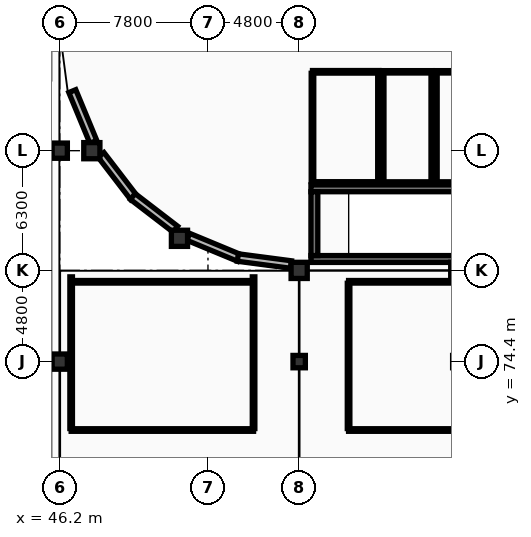
"""IFC4 building model, lengths in metres.
Left out: names, types, materials, properties, quantities, classifications, styles, units other than length and angle.
Written with IfcOpenShell. Run it as: python <this file> out.ifc"""

import sys

from ifc_helpers import new_model, si_unit, direction, frame, frame_2d, origin, origin_2d, place, context, subcontext, project, spatial, rectangle, circle, extrude, element, fill, save


model = new_model("IFC4")
c1 = context("Model", 3, precision=1e-05, world=origin(), true_north=direction((0.0, 1.0)))
c2 = subcontext(c1, "Body", "Model", "MODEL_VIEW")
j1 = project(units=[si_unit("LENGTHUNIT", "METRE"), si_unit("PLANEANGLEUNIT", "RADIAN")], contexts=[c1])
p1 = place(None, origin())
s1 = spatial("IfcSite", under=j1, at=p1, CompositionType="ELEMENT")
p2 = place(p1, origin())
s2 = spatial("IfcBuilding", under=s1, at=p2, CompositionType="ELEMENT")
p3 = place(p2, origin())
s3 = spatial("IfcBuildingStorey", under=s2, at=p3, CompositionType="ELEMENT", Elevation=0.0)
for number, where, z_axis, x_axis in (
    (1, (58.8, 79.2, 0.0), (0.0, 0.0, 1.0), (1.0, 0.0, 0.0)),
    (2, (67.2, 79.2, 0.0), (0.0, 0.0, 1.0), (1.0, 0.0, 0.0)),
):
    element("IfcColumn", number, at=place(p3, frame(where, z_axis=z_axis, x_axis=x_axis)), inside=s3, PredefinedType="COLUMN", context=c2, shape_type="SweptSolid", body=[
        extrude(rectangle(XDim=0.85, YDim=0.85, at=origin_2d()), origin(), (0.0, 0.0, 1.0), 5.4),
    ])
for number, where, z_axis, x_axis in (
    (3, (47.888, 85.5, 0.0), (0.0, 0.0, 1.0), (1.0, 0.0, 0.0)),
    (4, (52.5, 80.888, 0.0), (0.0, 0.0, 1.0), (1.0, 0.0, 0.0)),
):
    element("IfcColumn", number, at=place(p3, frame(where, z_axis=z_axis, x_axis=x_axis)), inside=s3, PredefinedType="COLUMN", context=c2, shape_type="SweptSolid", body=[
        extrude(circle(Radius=0.425, at=origin_2d()), origin(), (0.0, 0.0, 1.0), 5.4),
    ])
for number, where, z_axis, x_axis in (
    (5, (46.2, 74.4, 0.0), (0.0, 0.0, 1.0), (1.0, 0.0, 0.0)),
    (6, (46.2, 85.5, 0.0), (0.0, 0.0, 1.0), (1.0, 0.0, 0.0)),
):
    element("IfcColumn", number, at=place(p3, frame(where, z_axis=z_axis, x_axis=x_axis)), inside=s3, PredefinedType="COLUMN", context=c2, shape_type="SweptSolid", body=[
        extrude(rectangle(XDim=0.8, YDim=0.8, at=origin_2d()), origin(), (0.0, 0.0, 1.0), 5.4),
    ])
p4 = place(p3, frame((58.8, 74.4, 0.0), z_axis=(0.0, 0.0, 1.0), x_axis=(1.0, 0.0, 0.0)))
e7 = element("IfcColumn", 7, at=p4, inside=s3, PredefinedType="COLUMN", context=c2, shape_type="SweptSolid", body=[
    extrude(rectangle(XDim=0.65, YDim=0.65, at=origin_2d()), origin(), (0.0, 0.0, 1.0), 5.4),
])
p5 = place(p3, frame((46.86, 88.635, 0.0), z_axis=(0.0, 0.0, 1.0), x_axis=(0.382642547526, -0.923896466506, 0.0)))
e8 = element("IfcWall", 8, at=p5, inside=s3, PredefinedType="ELEMENTEDWALL", context=c2, shape_type="SweptSolid", body=[
    extrude(rectangle(XDim=2.892, YDim=0.395, at=frame_2d((1.446, 0.0))), origin(), (0.0, 0.0, 1.0), 4.27),
])
p6 = place(p5, frame((0.962, 0.0, 0.85)))
e9 = element("IfcOpeningElement", 9, at=p6, cuts=e8, PredefinedType="OPENING", context=c2, shape_type="SweptSolid", body=[
    extrude(rectangle(XDim=0.9, YDim=1.85, at=frame_2d((0.45, 0.925))), frame((0.0, 0.208, 0.0), z_axis=(0.0, -1.0, 0.0), x_axis=(1.0, 0.0, 0.0)), (0.0, 0.0, 1.0), 0.415),
])
p7 = place(p3, frame((48.369, 85.283, 0.0), z_axis=(0.0, 0.0, 1.0), x_axis=(0.608787157184, -0.793333597705, 0.0)))
e10 = element("IfcWall", 10, at=p7, inside=s3, PredefinedType="ELEMENTEDWALL", context=c2, shape_type="SweptSolid", body=[
    extrude(rectangle(XDim=2.824, YDim=0.395, at=frame_2d((1.412, 0.0))), origin(), (0.0, 0.0, 1.0), 4.27),
])
p8 = place(p7, frame((0.962, 0.0, 0.85)))
e11 = element("IfcOpeningElement", 11, at=p8, cuts=e10, PredefinedType="OPENING", context=c2, shape_type="SweptSolid", body=[
    extrude(rectangle(XDim=0.9, YDim=1.85, at=frame_2d((0.45, 0.925))), frame((0.0, 0.208, 0.0), z_axis=(0.0, -1.0, 0.0), x_axis=(1.0, 0.0, 0.0)), (0.0, 0.0, 1.0), 0.415),
])
p9 = place(p3, frame((50.043, 83.089, 0.0), z_axis=(0.0, 0.0, 1.0), x_axis=(0.793301558375, -0.608828906574, 0.0)))
e12 = element("IfcWall", 12, at=p9, inside=s3, PredefinedType="ELEMENTEDWALL", context=c2, shape_type="SweptSolid", body=[
    extrude(rectangle(XDim=2.824, YDim=0.395, at=frame_2d((1.412, 0.0))), origin(), (0.0, 0.0, 1.0), 4.17),
])
p10 = place(p9, frame((0.962, 0.0, 0.85)))
e13 = element("IfcOpeningElement", 13, at=p10, cuts=e12, PredefinedType="OPENING", context=c2, shape_type="SweptSolid", body=[
    extrude(rectangle(XDim=0.9, YDim=1.85, at=frame_2d((0.45, 0.925))), frame((0.0, 0.208, 0.0), z_axis=(0.0, -1.0, 0.0), x_axis=(1.0, 0.0, 0.0)), (0.0, 0.0, 1.0), 0.415),
])
p11 = place(p3, frame((52.962, 80.967, 0.0), z_axis=(0.0, 0.0, 1.0), x_axis=(0.923896466506, -0.382642547526, 0.0)))
e14 = element("IfcWall", 14, at=p11, inside=s3, PredefinedType="ELEMENTEDWALL", context=c2, shape_type="SweptSolid", body=[
    extrude(rectangle(XDim=2.892, YDim=0.395, at=frame_2d((1.446, 0.0))), origin(), (0.0, 0.0, 1.0), 4.17),
])
p12 = place(p11, frame((1.03, 0.0, 0.85)))
e15 = element("IfcOpeningElement", 15, at=p12, cuts=e14, PredefinedType="OPENING", context=c2, shape_type="SweptSolid", body=[
    extrude(rectangle(XDim=0.9, YDim=1.85, at=frame_2d((0.45, 0.925))), frame((0.0, 0.208, 0.0), z_axis=(0.0, -1.0, 0.0), x_axis=(1.0, 0.0, 0.0)), (0.0, 0.0, 1.0), 0.415),
])
p13 = place(p3, frame((55.572, 79.877, 0.0), z_axis=(0.0, 0.0, 1.0), x_axis=(0.991443994311, -0.130532778046, 0.0)))
e16 = element("IfcWall", 16, at=p13, inside=s3, PredefinedType="ELEMENTEDWALL", context=c2, shape_type="SweptSolid", body=[
    extrude(rectangle(XDim=2.824, YDim=0.395, at=frame_2d((1.412, 0.0))), origin(), (0.0, 0.0, 1.0), 4.27),
])
for number, where, z_axis, x_axis in (
    (17, (59.42, 83.52, 0.0), (0.0, 0.0, 1.0), (1.0, 0.0, 0.0)),
    (18, (68.78, 79.8, 0.0), (0.0, 0.0, 1.0), (-1.0, 0.0, 0.0)),
):
    element("IfcWall", number, at=place(p3, frame(where, z_axis=z_axis, x_axis=x_axis)), inside=s3, PredefinedType="SHEAR", context=c2, shape_type="SweptSolid", body=[
        extrude(rectangle(XDim=9.36, YDim=0.36, at=frame_2d((4.68, 0.0))), origin(), (0.0, 0.0, 1.0), 5.14),
    ])
p14 = place(p3, frame((59.6, 79.98, 0.0), z_axis=(0.0, 0.0, 1.0), x_axis=(0.0, 1.0, 0.0)))
e19 = element("IfcWall", 19, at=p14, inside=s3, PredefinedType="SHEAR", context=c2, shape_type="SweptSolid", body=[
    extrude(rectangle(XDim=3.36, YDim=0.36, at=frame_2d((1.68, 0.0))), origin(), (0.0, 0.0, 1.0), 5.14),
])
p15 = place(p14, frame((1.08, 0.0, 0.0)))
e20 = element("IfcOpeningElement", 20, at=p15, cuts=e19, PredefinedType="OPENING", context=c2, shape_type="SweptSolid", body=[
    extrude(rectangle(XDim=1.2, YDim=2.2, at=frame_2d((0.6, 1.1))), frame((0.0, 0.19, 0.0), z_axis=(0.0, -1.0, 0.0), x_axis=(1.0, 0.0, 0.0)), (0.0, 0.0, 1.0), 0.38),
])
p16 = place(p3, frame((63.2, 89.65, 0.0), z_axis=(0.0, 0.0, 1.0), x_axis=(1.0, 0.0, 0.0)))
e21 = element("IfcWall", 21, at=p16, inside=s3, PredefinedType="PARTITIONING", context=c2, shape_type="SweptSolid", body=[
    extrude(rectangle(XDim=2.6, YDim=0.125, at=frame_2d((1.3, 0.0))), origin(), (0.0, 0.0, 1.0), 5.125),
])
p17 = place(p16, frame((0.85, 0.0, 0.0)))
e22 = element("IfcOpeningElement", 22, at=p17, cuts=e21, PredefinedType="OPENING", context=c2, shape_type="SweptSolid", body=[
    extrude(rectangle(XDim=0.9, YDim=2.1, at=frame_2d((0.45, 1.05))), frame((0.0, 0.073, 0.0), z_axis=(0.0, -1.0, 0.0), x_axis=(1.0, 0.0, 0.0)), (0.0, 0.0, 1.0), 0.145),
])
p18 = place(p3, frame((65.8, 83.8, 0.0), z_axis=(0.0, 0.0, 1.0), x_axis=(-1.0, 0.0, 0.0)))
e23 = element("IfcWall", 23, at=p18, inside=s3, PredefinedType="PARTITIONING", context=c2, shape_type="SweptSolid", body=[
    extrude(rectangle(XDim=2.6, YDim=0.125, at=frame_2d((1.3, 0.0))), origin(), (0.0, 0.0, 1.0), 5.125),
])
for number, where, z_axis, x_axis in (
    (24, (63.2, 83.873, 0.0), (0.0, 0.0, 1.0), (0.0, 1.0, 0.0)),
    (25, (65.8, 89.577, 0.0), (0.0, 0.0, 1.0), (0.0, -1.0, 0.0)),
):
    element("IfcWall", number, at=place(p3, frame(where, z_axis=z_axis, x_axis=x_axis)), inside=s3, PredefinedType="PARTITIONING", context=c2, shape_type="SweptSolid", body=[
        extrude(rectangle(XDim=5.705, YDim=0.125, at=frame_2d((2.853, 0.0))), origin(), (0.0, 0.0, 1.0), 5.125),
    ])
p19 = place(p3, frame((66.0, 89.65, 0.0), z_axis=(0.0, 0.0, 1.0), x_axis=(1.0, 0.0, 0.0)))
e26 = element("IfcWall", 26, at=p19, inside=s3, PredefinedType="PARTITIONING", context=c2, shape_type="SweptSolid", body=[
    extrude(rectangle(XDim=2.6, YDim=0.125, at=frame_2d((1.3, 0.0))), origin(), (0.0, 0.0, 1.0), 4.27),
])
p20 = place(p19, frame((0.8, 0.0, 0.0)))
e27 = element("IfcOpeningElement", 27, at=p20, cuts=e26, PredefinedType="OPENING", context=c2, shape_type="SweptSolid", body=[
    extrude(rectangle(XDim=1.0, YDim=2.1, at=frame_2d((0.5, 1.05))), frame((0.0, 0.073, 0.0), z_axis=(0.0, -1.0, 0.0), x_axis=(1.0, 0.0, 0.0)), (0.0, 0.0, 1.0), 0.145),
])
p21 = place(p3, frame((68.6, 83.8, 0.0), z_axis=(0.0, 0.0, 1.0), x_axis=(-1.0, 0.0, 0.0)))
e28 = element("IfcWall", 28, at=p21, inside=s3, PredefinedType="PARTITIONING", context=c2, shape_type="SweptSolid", body=[
    extrude(rectangle(XDim=2.6, YDim=0.125, at=frame_2d((1.3, 0.0))), origin(), (0.0, 0.0, 1.0), 4.27),
])
p22 = place(p3, frame((66.0, 83.873, 0.0), z_axis=(0.0, 0.0, 1.0), x_axis=(0.0, 1.0, 0.0)))
e29 = element("IfcWall", 29, at=p22, inside=s3, PredefinedType="PARTITIONING", context=c2, shape_type="SweptSolid", body=[
    extrude(rectangle(XDim=5.705, YDim=0.125, at=frame_2d((2.853, 0.0))), origin(), (0.0, 0.0, 1.0), 5.125),
])
p23 = place(p3, frame((59.5, 89.65, 0.0), z_axis=(0.0, 0.0, 1.0), x_axis=(1.0, 0.0, 0.0)))
e30 = element("IfcWall", 30, at=p23, inside=s3, PredefinedType="PARTITIONING", context=c2, shape_type="SweptSolid", body=[
    extrude(rectangle(XDim=3.5, YDim=0.135, at=frame_2d((1.75, 0.0))), origin(), (0.0, 0.0, 1.0), 5.125),
])
p24 = place(p23, frame((1.275, 0.0, 0.0)))
e31 = element("IfcOpeningElement", 31, at=p24, cuts=e30, PredefinedType="OPENING", context=c2, shape_type="SweptSolid", body=[
    extrude(rectangle(XDim=0.95, YDim=2.15, at=frame_2d((0.475, 1.075))), frame((0.0, 0.077, 0.0), z_axis=(0.0, -1.0, 0.0), x_axis=(1.0, 0.0, 0.0)), (0.0, 0.0, 1.0), 0.155),
])
p25 = place(p3, frame((63.0, 83.8, 0.0), z_axis=(0.0, 0.0, 1.0), x_axis=(-1.0, 0.0, 0.0)))
e32 = element("IfcWall", 32, at=p25, inside=s3, PredefinedType="PARTITIONING", context=c2, shape_type="SweptSolid", body=[
    extrude(rectangle(XDim=3.5, YDim=0.135, at=frame_2d((1.75, 0.0))), origin(), (0.0, 0.0, 1.0), 5.125),
])
for number, where, z_axis, x_axis in (
    (33, (59.5, 83.877, 0.0), (0.0, 0.0, 1.0), (0.0, 1.0, 0.0)),
    (34, (63.0, 89.573, 0.0), (0.0, 0.0, 1.0), (0.0, -1.0, 0.0)),
):
    element("IfcWall", number, at=place(p3, frame(where, z_axis=z_axis, x_axis=x_axis)), inside=s3, PredefinedType="PARTITIONING", context=c2, shape_type="SweptSolid", body=[
        extrude(rectangle(XDim=5.695, YDim=0.135, at=frame_2d((2.848, 0.0))), origin(), (0.0, 0.0, 1.0), 5.125),
    ])
p26 = place(p3, frame((46.8, 78.6, 0.0), z_axis=(0.0, 0.0, 1.0), x_axis=(1.0, 0.0, 0.0)))
e35 = element("IfcWall", 35, at=p26, inside=s3, PredefinedType="PARTITIONING", context=c2, shape_type="SweptSolid", body=[
    extrude(rectangle(XDim=9.6, YDim=0.135, at=frame_2d((4.8, 0.0))), origin(), (0.0, 0.0, 1.0), 5.125),
])
p27 = place(p3, frame((56.4, 70.8, 0.0), z_axis=(0.0, 0.0, 1.0), x_axis=(-1.0, 0.0, 0.0)))
e36 = element("IfcWall", 36, at=p27, inside=s3, PredefinedType="PARTITIONING", context=c2, shape_type="SweptSolid", body=[
    extrude(rectangle(XDim=9.6, YDim=0.135, at=frame_2d((4.8, 0.0))), origin(), (0.0, 0.0, 1.0), 4.53),
])
p28 = place(p27, frame((1.94, 0.0, 0.0)))
e37 = element("IfcOpeningElement", 37, at=p28, cuts=e36, PredefinedType="OPENING", context=c2, shape_type="SweptSolid", body=[
    extrude(rectangle(XDim=0.95, YDim=2.15, at=frame_2d((0.475, 1.075))), frame((0.0, 0.077, 0.0), z_axis=(0.0, -1.0, 0.0), x_axis=(1.0, 0.0, 0.0)), (0.0, 0.0, 1.0), 0.155),
])
for number, where, z_axis, x_axis in (
    (38, (46.8, 70.877, 0.0), (0.0, 0.0, 1.0), (0.0, 1.0, 0.0)),
    (39, (56.4, 78.86, 0.0), (0.0, 0.0, 1.0), (0.0, -1.0, 0.0)),
):
    element("IfcWall", number, at=place(p3, frame(where, z_axis=z_axis, x_axis=x_axis)), inside=s3, PredefinedType="PARTITIONING", context=c2, shape_type="SweptSolid", body=[
        extrude(rectangle(XDim=7.983, YDim=0.135, at=frame_2d((3.991, 0.0))), origin(), (0.0, 0.0, 1.0), 4.23),
    ])
p29 = place(p3, frame((61.4, 78.6, 0.0), z_axis=(0.0, 0.0, 1.0), x_axis=(1.0, 0.0, 0.0)))
e40 = element("IfcWall", 40, at=p29, inside=s3, PredefinedType="PARTITIONING", context=c2, shape_type="SweptSolid", body=[
    extrude(rectangle(XDim=38.0, YDim=0.135, at=frame_2d((19.0, 0.0))), origin(), (0.0, 0.0, 1.0), 4.58),
])
p30 = place(p3, frame((99.4, 70.8, 0.0), z_axis=(0.0, 0.0, 1.0), x_axis=(-1.0, 0.0, 0.0)))
e41 = element("IfcWall", 41, at=p30, inside=s3, PredefinedType="PARTITIONING", context=c2, shape_type="SweptSolid", body=[
    extrude(rectangle(XDim=38.0, YDim=0.135, at=frame_2d((19.0, 0.0))), origin(), (0.0, 0.0, 1.0), 4.53),
])
p31 = place(p30, frame((2.167, 0.0, 0.0)))
e42 = element("IfcOpeningElement", 42, at=p31, cuts=e41, PredefinedType="OPENING", context=c2, shape_type="SweptSolid", body=[
    extrude(rectangle(XDim=0.95, YDim=2.15, at=frame_2d((0.475, 1.075))), frame((0.0, 0.077, 0.0), z_axis=(0.0, -1.0, 0.0), x_axis=(1.0, 0.0, 0.0)), (0.0, 0.0, 1.0), 0.155),
])
p32 = place(p3, frame((61.4, 70.877, 0.0), z_axis=(0.0, 0.0, 1.0), x_axis=(0.0, 1.0, 0.0)))
e43 = element("IfcWall", 43, at=p32, inside=s3, PredefinedType="PARTITIONING", context=c2, shape_type="SweptSolid", body=[
    extrude(rectangle(XDim=7.645, YDim=0.135, at=frame_2d((3.823, 0.0))), origin(), (0.0, 0.0, 1.0), 4.43),
])
p33 = place(p6, origin())
e44 = element("IfcWindow", 44, at=p33, inside=s3, PartitioningType="SINGLE_PANEL", PredefinedType="WINDOW", context=c2, shape_type="SweptSolid", body=[
    extrude(rectangle(XDim=0.9, YDim=1.85, at=frame_2d((0.45, 0.925))), frame((0.0, 0.03, 0.0), z_axis=(0.0, -1.0, 0.0), x_axis=(1.0, 0.0, 0.0)), (0.0, 0.0, 1.0), 0.06),
])
fill(e9, e44)
p34 = place(p8, origin())
e45 = element("IfcWindow", 45, at=p34, inside=s3, PartitioningType="SINGLE_PANEL", PredefinedType="WINDOW", context=c2, shape_type="SweptSolid", body=[
    extrude(rectangle(XDim=0.9, YDim=1.85, at=frame_2d((0.45, 0.925))), frame((0.0, 0.03, 0.0), z_axis=(0.0, -1.0, 0.0), x_axis=(1.0, 0.0, 0.0)), (0.0, 0.0, 1.0), 0.06),
])
fill(e11, e45)
p35 = place(p10, origin())
e46 = element("IfcWindow", 46, at=p35, inside=s3, PartitioningType="SINGLE_PANEL", PredefinedType="WINDOW", context=c2, shape_type="SweptSolid", body=[
    extrude(rectangle(XDim=0.9, YDim=1.85, at=frame_2d((0.45, 0.925))), frame((0.0, 0.03, 0.0), z_axis=(0.0, -1.0, 0.0), x_axis=(1.0, 0.0, 0.0)), (0.0, 0.0, 1.0), 0.06),
])
fill(e13, e46)
p36 = place(p12, origin())
e47 = element("IfcWindow", 47, at=p36, inside=s3, PartitioningType="SINGLE_PANEL", PredefinedType="WINDOW", context=c2, shape_type="SweptSolid", body=[
    extrude(rectangle(XDim=0.9, YDim=1.85, at=frame_2d((0.45, 0.925))), frame((0.0, 0.03, 0.0), z_axis=(0.0, -1.0, 0.0), x_axis=(1.0, 0.0, 0.0)), (0.0, 0.0, 1.0), 0.06),
])
fill(e15, e47)
p37 = place(p15, origin())
e48 = element("IfcDoor", 48, at=p37, inside=s3, OperationType="SINGLE_SWING_LEFT", PredefinedType="DOOR", context=c2, shape_type="SweptSolid", body=[
    extrude(rectangle(XDim=1.2, YDim=2.2, at=frame_2d((0.6, 1.1))), frame((0.0, 0.025, 0.0), z_axis=(0.0, -1.0, 0.0), x_axis=(1.0, 0.0, 0.0)), (0.0, 0.0, 1.0), 0.05),
])
fill(e20, e48)
p38 = place(p17, origin())
e49 = element("IfcDoor", 49, at=p38, inside=s3, OperationType="SINGLE_SWING_RIGHT", PredefinedType="DOOR", context=c2, shape_type="SweptSolid", body=[
    extrude(rectangle(XDim=0.9, YDim=2.1, at=frame_2d((0.45, 1.05))), frame((0.0, 0.025, 0.0), z_axis=(0.0, -1.0, 0.0), x_axis=(1.0, 0.0, 0.0)), (0.0, 0.0, 1.0), 0.05),
])
fill(e22, e49)
p39 = place(p24, origin())
e50 = element("IfcDoor", 50, at=p39, inside=s3, OperationType="SINGLE_SWING_RIGHT", PredefinedType="DOOR", context=c2, shape_type="SweptSolid", body=[
    extrude(rectangle(XDim=0.95, YDim=2.15, at=frame_2d((0.475, 1.075))), frame((0.0, 0.025, 0.0), z_axis=(0.0, -1.0, 0.0), x_axis=(1.0, 0.0, 0.0)), (0.0, 0.0, 1.0), 0.05),
])
fill(e31, e50)
p40 = place(p28, origin())
e51 = element("IfcDoor", 51, at=p40, inside=s3, OperationType="SINGLE_SWING_RIGHT", PredefinedType="DOOR", context=c2, shape_type="SweptSolid", body=[
    extrude(rectangle(XDim=0.95, YDim=2.15, at=frame_2d((0.475, 1.075))), frame((0.0, 0.025, 0.0), z_axis=(0.0, -1.0, 0.0), x_axis=(1.0, 0.0, 0.0)), (0.0, 0.0, 1.0), 0.05),
])
fill(e37, e51)
save(model, sys.argv[1])
